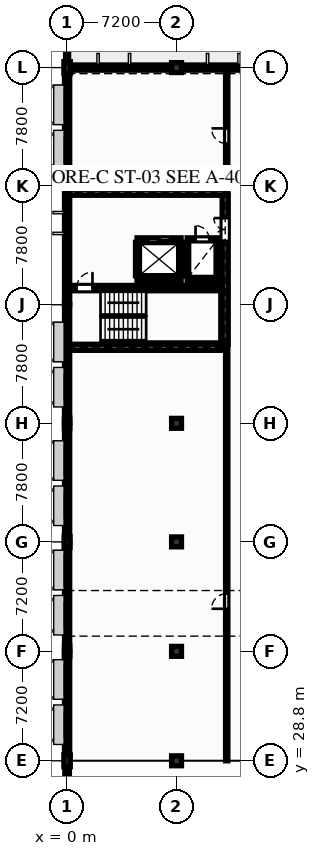
"""IFC4 building model, lengths in metres.
Left out: names, types, materials, properties, quantities, classifications, styles, units other than length and angle.
Written with IfcOpenShell. Run it as: python <this file> out.ifc"""

import sys

from ifc_helpers import new_model, si_unit, direction, frame, frame_2d, origin, origin_2d, place, context, subcontext, project, spatial, rectangle, extrude, element, fill, save


model = new_model("IFC4")
c1 = context("Model", 3, precision=1e-05, world=origin(), true_north=direction((0.0, 1.0)))
c2 = subcontext(c1, "Body", "Model", "MODEL_VIEW")
j1 = project(units=[si_unit("LENGTHUNIT", "METRE"), si_unit("PLANEANGLEUNIT", "RADIAN")], contexts=[c1])
p1 = place(None, origin())
s1 = spatial("IfcSite", under=j1, at=p1, CompositionType="ELEMENT")
p2 = place(p1, origin())
s2 = spatial("IfcBuilding", under=s1, at=p2, CompositionType="ELEMENT")
p3 = place(p2, frame((0.0, 0.0, 5.1)))
s3 = spatial("IfcBuildingStorey", under=s2, at=p3, CompositionType="ELEMENT", Elevation=5.1)
p4 = place(p3, frame((0.0, 28.8, 0.0), z_axis=(0.0, 0.0, 1.0), x_axis=(1.0, 0.0, 0.0)))
e1 = element("IfcColumn", 1, at=p4, inside=s3, PredefinedType="PILASTER", context=c2, shape_type="SweptSolid", body=[
    extrude(rectangle(XDim=0.42, YDim=0.78, at=origin_2d()), origin(), (0.0, 0.0, 1.0), 3.84),
])
p5 = place(p3, frame((0.0, 36.0, 0.0), z_axis=(0.0, 0.0, 1.0), x_axis=(1.0, 0.0, 0.0)))
e2 = element("IfcColumn", 2, at=p5, inside=s3, PredefinedType="PILASTER", context=c2, shape_type="SweptSolid", body=[
    extrude(rectangle(XDim=0.35, YDim=0.7, at=origin_2d()), origin(), (0.0, 0.0, 1.0), 3.84),
])
p6 = place(p3, frame((0.0, 43.2, 0.0), z_axis=(0.0, 0.0, 1.0), x_axis=(1.0, 0.0, 0.0)))
e3 = element("IfcColumn", 3, at=p6, inside=s3, PredefinedType="PILASTER", context=c2, shape_type="SweptSolid", body=[
    extrude(rectangle(XDim=0.38, YDim=0.72, at=origin_2d()), origin(), (0.0, 0.0, 1.0), 3.84),
])
p7 = place(p3, frame((0.0, 51.0, 0.0), z_axis=(0.0, 0.0, 1.0), x_axis=(1.0, 0.0, 0.0)))
e4 = element("IfcColumn", 4, at=p7, inside=s3, PredefinedType="PILASTER", context=c2, shape_type="SweptSolid", body=[
    extrude(rectangle(XDim=0.35, YDim=0.7, at=origin_2d()), origin(), (0.0, 0.0, 1.0), 3.84),
])
p8 = place(p3, frame((0.0, 74.4, 0.0), z_axis=(0.0, 0.0, 1.0), x_axis=(1.0, 0.0, 0.0)))
e5 = element("IfcColumn", 5, at=p8, inside=s3, PredefinedType="PILASTER", context=c2, shape_type="SweptSolid", body=[
    extrude(rectangle(XDim=0.42, YDim=0.78, at=origin_2d()), origin(), (0.0, 0.0, 1.0), 3.84),
])
for number, where, z_axis, x_axis in (
    (6, (7.2, 28.8, 0.0), (0.0, 0.0, 1.0), (1.0, 0.0, 0.0)),
    (7, (7.2, 36.0, 0.0), (0.0, 0.0, 1.0), (1.0, 0.0, 0.0)),
    (8, (7.2, 43.2, 0.0), (0.0, 0.0, 1.0), (1.0, 0.0, 0.0)),
    (9, (7.2, 51.0, 0.0), (0.0, 0.0, 1.0), (1.0, 0.0, 0.0)),
    (10, (7.2, 74.4, 0.0), (0.0, 0.0, 1.0), (1.0, 0.0, 0.0)),
):
    element("IfcColumn", number, at=place(p3, frame(where, z_axis=z_axis, x_axis=x_axis)), inside=s3, PredefinedType="COLUMN", context=c2, shape_type="SweptSolid", body=[
        extrude(rectangle(XDim=0.65, YDim=0.65, at=origin_2d()), origin(), (0.0, 0.0, 1.0), 3.84),
    ])
p9 = place(p3, frame((0.0, 28.8, 0.0), z_axis=(0.0, 0.0, 1.0), x_axis=(0.0, 1.0, 0.0)))
e11 = element("IfcWall", 11, at=p9, inside=s3, PredefinedType="SOLIDWALL", context=c2, shape_type="SweptSolid", body=[
    extrude(rectangle(XDim=7.2, YDim=0.34, at=frame_2d((3.6, 0.0))), origin(), (0.0, 0.0, 1.0), 3.55),
])
p10 = place(p9, frame((1.5, 0.0, 0.85)))
e12 = element("IfcOpeningElement", 12, at=p10, cuts=e11, PredefinedType="OPENING", context=c2, shape_type="SweptSolid", body=[
    extrude(rectangle(XDim=1.75, YDim=2.15, at=frame_2d((0.875, 1.075))), frame((0.0, 0.18, 0.0), z_axis=(0.0, -1.0, 0.0), x_axis=(1.0, 0.0, 0.0)), (0.0, 0.0, 1.0), 0.36),
])
p11 = place(p9, frame((4.3, 0.0, 0.828)))
e13 = element("IfcOpeningElement", 13, at=p11, cuts=e11, PredefinedType="OPENING", context=c2, shape_type="SweptSolid", body=[
    extrude(rectangle(XDim=2.1, YDim=2.25, at=frame_2d((1.05, 1.125))), frame((0.0, 0.18, 0.0), z_axis=(0.0, -1.0, 0.0), x_axis=(1.0, 0.0, 0.0)), (0.0, 0.0, 1.0), 0.36),
])
p12 = place(p3, frame((0.0, 36.0, 0.0), z_axis=(0.0, 0.0, 1.0), x_axis=(0.0, 1.0, 0.0)))
e14 = element("IfcWall", 14, at=p12, inside=s3, PredefinedType="SOLIDWALL", context=c2, shape_type="SweptSolid", body=[
    extrude(rectangle(XDim=7.2, YDim=0.34, at=frame_2d((3.6, 0.0))), origin(), (0.0, 0.0, 1.0), 3.55),
])
p13 = place(p12, frame((1.5, 0.0, 0.85)))
e15 = element("IfcOpeningElement", 15, at=p13, cuts=e14, PredefinedType="OPENING", context=c2, shape_type="SweptSolid", body=[
    extrude(rectangle(XDim=1.75, YDim=2.15, at=frame_2d((0.875, 1.075))), frame((0.0, 0.18, 0.0), z_axis=(0.0, -1.0, 0.0), x_axis=(1.0, 0.0, 0.0)), (0.0, 0.0, 1.0), 0.36),
])
p14 = place(p12, frame((4.3, 0.0, 0.798)))
e16 = element("IfcOpeningElement", 16, at=p14, cuts=e14, PredefinedType="OPENING", context=c2, shape_type="SweptSolid", body=[
    extrude(rectangle(XDim=2.1, YDim=2.25, at=frame_2d((1.05, 1.125))), frame((0.0, 0.18, 0.0), z_axis=(0.0, -1.0, 0.0), x_axis=(1.0, 0.0, 0.0)), (0.0, 0.0, 1.0), 0.36),
])
p15 = place(p3, frame((0.0, 43.2, 0.0), z_axis=(0.0, 0.0, 1.0), x_axis=(0.0, 1.0, 0.0)))
e17 = element("IfcWall", 17, at=p15, inside=s3, PredefinedType="SOLIDWALL", context=c2, shape_type="SweptSolid", body=[
    extrude(rectangle(XDim=7.8, YDim=0.34, at=frame_2d((3.9, 0.0))), origin(), (0.0, 0.0, 1.0), 3.55),
])
p16 = place(p15, frame((1.5, 0.0, 0.85)))
e18 = element("IfcOpeningElement", 18, at=p16, cuts=e17, PredefinedType="OPENING", context=c2, shape_type="SweptSolid", body=[
    extrude(rectangle(XDim=1.75, YDim=2.15, at=frame_2d((0.875, 1.075))), frame((0.0, 0.18, 0.0), z_axis=(0.0, -1.0, 0.0), x_axis=(1.0, 0.0, 0.0)), (0.0, 0.0, 1.0), 0.36),
])
p17 = place(p15, frame((4.3, 0.0, 0.798)))
e19 = element("IfcOpeningElement", 19, at=p17, cuts=e17, PredefinedType="OPENING", context=c2, shape_type="SweptSolid", body=[
    extrude(rectangle(XDim=2.1, YDim=2.25, at=frame_2d((1.05, 1.125))), frame((0.0, 0.18, 0.0), z_axis=(0.0, -1.0, 0.0), x_axis=(1.0, 0.0, 0.0)), (0.0, 0.0, 1.0), 0.36),
])
p18 = place(p3, frame((0.0, 51.0, 0.0), z_axis=(0.0, 0.0, 1.0), x_axis=(0.0, 1.0, 0.0)))
e20 = element("IfcWall", 20, at=p18, inside=s3, PredefinedType="SOLIDWALL", context=c2, shape_type="SweptSolid", body=[
    extrude(rectangle(XDim=7.8, YDim=0.34, at=frame_2d((3.9, 0.0))), origin(), (0.0, 0.0, 1.0), 3.55),
])
p19 = place(p18, frame((1.5, 0.0, 0.85)))
e21 = element("IfcOpeningElement", 21, at=p19, cuts=e20, PredefinedType="OPENING", context=c2, shape_type="SweptSolid", body=[
    extrude(rectangle(XDim=1.75, YDim=2.15, at=frame_2d((0.875, 1.075))), frame((0.0, 0.18, 0.0), z_axis=(0.0, -1.0, 0.0), x_axis=(1.0, 0.0, 0.0)), (0.0, 0.0, 1.0), 0.36),
])
p20 = place(p3, frame((0.0, 58.8, 0.0), z_axis=(0.0, 0.0, 1.0), x_axis=(0.0, 1.0, 0.0)))
e22 = element("IfcWall", 22, at=p20, inside=s3, PredefinedType="SOLIDWALL", context=c2, shape_type="SweptSolid", body=[
    extrude(rectangle(XDim=7.8, YDim=0.34, at=frame_2d((3.9, 0.0))), origin(), (0.0, 0.0, 1.0), 3.55),
])
p21 = place(p20, frame((4.85, 0.0, 1.1)))
e23 = element("IfcOpeningElement", 23, at=p21, cuts=e22, PredefinedType="OPENING", context=c2, shape_type="SweptSolid", body=[
    extrude(rectangle(XDim=1.05, YDim=1.75, at=frame_2d((0.525, 0.875))), frame((0.0, 0.18, 0.0), z_axis=(0.0, -1.0, 0.0), x_axis=(1.0, 0.0, 0.0)), (0.0, 0.0, 1.0), 0.36),
])
p22 = place(p3, frame((0.0, 66.6, 0.0), z_axis=(0.0, 0.0, 1.0), x_axis=(0.0, 1.0, 0.0)))
e24 = element("IfcWall", 24, at=p22, inside=s3, PredefinedType="SOLIDWALL", context=c2, shape_type="SweptSolid", body=[
    extrude(rectangle(XDim=7.8, YDim=0.34, at=frame_2d((3.9, 0.0))), origin(), (0.0, 0.0, 1.0), 3.55),
])
p23 = place(p22, frame((1.5, 0.0, 0.85)))
e25 = element("IfcOpeningElement", 25, at=p23, cuts=e24, PredefinedType="OPENING", context=c2, shape_type="SweptSolid", body=[
    extrude(rectangle(XDim=1.75, YDim=2.15, at=frame_2d((0.875, 1.075))), frame((0.0, 0.18, 0.0), z_axis=(0.0, -1.0, 0.0), x_axis=(1.0, 0.0, 0.0)), (0.0, 0.0, 1.0), 0.36),
])
p24 = place(p22, frame((4.3, 0.0, 0.85)))
e26 = element("IfcOpeningElement", 26, at=p24, cuts=e24, PredefinedType="OPENING", context=c2, shape_type="SweptSolid", body=[
    extrude(rectangle(XDim=2.1, YDim=2.25, at=frame_2d((1.05, 1.125))), frame((0.0, 0.18, 0.0), z_axis=(0.0, -1.0, 0.0), x_axis=(1.0, 0.0, 0.0)), (0.0, 0.0, 1.0), 0.36),
])
p25 = place(p3, frame((0.0, 74.4, 0.0), z_axis=(0.0, 0.0, 1.0), x_axis=(1.0, 0.0, 0.0)))
e27 = element("IfcWall", 27, at=p25, inside=s3, PredefinedType="SOLIDWALL", context=c2, shape_type="SweptSolid", body=[
    extrude(rectangle(XDim=7.2, YDim=0.34, at=frame_2d((3.6, 0.0))), origin(), (0.0, 0.0, 1.0), 3.55),
])
p26 = place(p25, frame((2.2, 0.0, 0.898)))
e28 = element("IfcOpeningElement", 28, at=p26, cuts=e27, PredefinedType="OPENING", context=c2, shape_type="SweptSolid", body=[
    extrude(rectangle(XDim=1.75, YDim=2.15, at=frame_2d((0.875, 1.075))), frame((0.0, 0.18, 0.0), z_axis=(0.0, -1.0, 0.0), x_axis=(1.0, 0.0, 0.0)), (0.0, 0.0, 1.0), 0.36),
])
p27 = place(p3, frame((7.2, 74.4, 0.0), z_axis=(0.0, 0.0, 1.0), x_axis=(1.0, 0.0, 0.0)))
e29 = element("IfcWall", 29, at=p27, inside=s3, PredefinedType="SOLIDWALL", context=c2, shape_type="SweptSolid", body=[
    extrude(rectangle(XDim=7.2, YDim=0.34, at=frame_2d((3.6, 0.0))), origin(), (0.0, 0.0, 1.0), 3.55),
])
p28 = place(p27, frame((4.4, 0.0, 0.898)))
e30 = element("IfcOpeningElement", 30, at=p28, cuts=e29, PredefinedType="OPENING", context=c2, shape_type="SweptSolid", body=[
    extrude(rectangle(XDim=1.75, YDim=2.15, at=frame_2d((0.875, 1.075))), frame((0.0, 0.18, 0.0), z_axis=(0.0, -1.0, 0.0), x_axis=(1.0, 0.0, 0.0)), (0.0, 0.0, 1.0), 0.36),
])
p29 = place(p3, frame((0.0, 21.6, 0.0), z_axis=(0.0, 0.0, 1.0), x_axis=(0.0, 1.0, 0.0)))
e31 = element("IfcWall", 31, at=p29, inside=s3, PredefinedType="SOLIDWALL", context=c2, shape_type="SweptSolid", body=[
    extrude(rectangle(XDim=7.2, YDim=0.3, at=frame_2d((3.6, 0.0))), origin(), (0.0, 0.0, 1.0), 2.905),
])
p30 = place(p29, frame((2.0, 0.0, 0.685)))
e32 = element("IfcOpeningElement", 32, at=p30, cuts=e31, PredefinedType="OPENING", context=c2, shape_type="SweptSolid", body=[
    extrude(rectangle(XDim=1.2, YDim=2.1, at=frame_2d((0.6, 1.05))), frame((0.0, 0.16, 0.0), z_axis=(0.0, -1.0, 0.0), x_axis=(1.0, 0.0, 0.0)), (0.0, 0.0, 1.0), 0.32),
])
p31 = place(p3, frame((0.0, 82.0, 0.0), z_axis=(0.0, 0.0, 1.0), x_axis=(0.0, -1.0, 0.0)))
e33 = element("IfcWall", 33, at=p31, inside=s3, PredefinedType="PARAPET", context=c2, shape_type="SweptSolid", body=[
    extrude(rectangle(XDim=7.4, YDim=0.2, at=frame_2d((3.7, 0.0))), origin(), (0.0, 0.0, 1.0), 0.72),
])
for number, where, z_axis, x_axis in (
    (34, (0.17, 56.0, 0.0), (0.0, 0.0, 1.0), (1.0, 0.0, 0.0)),
    (35, (0.17, 66.2, 0.0), (0.0, 0.0, 1.0), (1.0, 0.0, 0.0)),
):
    element("IfcWall", number, at=place(p3, frame(where, z_axis=z_axis, x_axis=x_axis)), inside=s3, PredefinedType="SHEAR", context=c2, shape_type="SweptSolid", body=[
        extrude(rectangle(XDim=10.23, YDim=0.4, at=frame_2d((5.115, 0.0))), origin(), (0.0, 0.0, 1.0), 3.55),
    ])
p32 = place(p3, frame((10.4, 56.2, 0.0), z_axis=(0.0, 0.0, 1.0), x_axis=(0.0, 1.0, 0.0)))
e36 = element("IfcWall", 36, at=p32, inside=s3, PredefinedType="SHEAR", context=c2, shape_type="SweptSolid", body=[
    extrude(rectangle(XDim=9.8, YDim=0.4, at=frame_2d((4.9, 0.0))), origin(), (0.0, 0.0, 1.0), 3.55),
])
p33 = place(p32, frame((6.8, 0.0, 0.0)))
e37 = element("IfcOpeningElement", 37, at=p33, cuts=e36, PredefinedType="OPENING", context=c2, shape_type="SweptSolid", body=[
    extrude(rectangle(XDim=1.5, YDim=2.2, at=frame_2d((0.75, 1.1))), frame((0.0, 0.21, 0.0), z_axis=(0.0, -1.0, 0.0), x_axis=(1.0, 0.0, 0.0)), (0.0, 0.0, 1.0), 0.42),
])
p34 = place(p3, frame((0.17, 59.895, 0.0), z_axis=(0.0, 0.0, 1.0), x_axis=(1.0, 0.0, 0.0)))
e38 = element("IfcWall", 38, at=p34, inside=s3, PredefinedType="SHEAR", context=c2, shape_type="SweptSolid", body=[
    extrude(rectangle(XDim=10.03, YDim=0.35, at=frame_2d((5.015, 0.0))), origin(), (0.0, 0.0, 1.0), 3.55),
])
p35 = place(p34, frame((0.45, 0.0, 0.0)))
e39 = element("IfcOpeningElement", 39, at=p35, cuts=e38, PredefinedType="OPENING", context=c2, shape_type="SweptSolid", body=[
    extrude(rectangle(XDim=1.05, YDim=2.2, at=frame_2d((0.525, 1.1))), frame((0.0, 0.185, 0.0), z_axis=(0.0, -1.0, 0.0), x_axis=(1.0, 0.0, 0.0)), (0.0, 0.0, 1.0), 0.37),
])
p36 = place(p3, frame((4.6, 60.5, 0.0), z_axis=(0.0, 0.0, 1.0), x_axis=(1.0, 0.0, 0.0)))
e40 = element("IfcWall", 40, at=p36, inside=s3, PredefinedType="PARTITIONING", context=c2, shape_type="SweptSolid", body=[
    extrude(rectangle(XDim=2.9, YDim=0.2, at=frame_2d((1.45, 0.0))), origin(), (0.0, 0.0, 1.0), 3.55),
])
p37 = place(p3, frame((4.6, 63.1, 0.0), z_axis=(0.0, 0.0, 1.0), x_axis=(1.0, 0.0, 0.0)))
e41 = element("IfcWall", 41, at=p37, inside=s3, PredefinedType="PARTITIONING", context=c2, shape_type="SweptSolid", body=[
    extrude(rectangle(XDim=2.9, YDim=0.2, at=frame_2d((1.45, 0.0))), origin(), (0.0, 0.0, 1.0), 3.55),
])
p38 = place(p37, frame((0.75, 0.0, 0.0)))
e42 = element("IfcOpeningElement", 42, at=p38, cuts=e41, PredefinedType="OPENING", context=c2, shape_type="SweptSolid", body=[
    extrude(rectangle(XDim=1.4, YDim=2.25, at=frame_2d((0.7, 1.125))), frame((0.0, 0.11, 0.0), z_axis=(0.0, -1.0, 0.0), x_axis=(1.0, 0.0, 0.0)), (0.0, 0.0, 1.0), 0.22),
])
for number, where, z_axis, x_axis in (
    (43, (4.6, 60.7, 0.0), (0.0, 0.0, 1.0), (0.0, 1.0, 0.0)),
    (44, (7.5, 60.7, 0.0), (0.0, 0.0, 1.0), (0.0, 1.0, 0.0)),
):
    element("IfcWall", number, at=place(p3, frame(where, z_axis=z_axis, x_axis=x_axis)), inside=s3, PredefinedType="PARTITIONING", context=c2, shape_type="SweptSolid", body=[
        extrude(rectangle(XDim=2.2, YDim=0.2, at=frame_2d((1.1, 0.0))), origin(), (0.0, 0.0, 1.0), 3.55),
    ])
p39 = place(p3, frame((7.9, 60.5, 0.0), z_axis=(0.0, 0.0, 1.0), x_axis=(1.0, 0.0, 0.0)))
e45 = element("IfcWall", 45, at=p39, inside=s3, PredefinedType="PARTITIONING", context=c2, shape_type="SweptSolid", body=[
    extrude(rectangle(XDim=2.0, YDim=0.2, at=frame_2d((1.0, 0.0))), origin(), (0.0, 0.0, 1.0), 3.55),
])
p40 = place(p3, frame((7.9, 63.1, 0.0), z_axis=(0.0, 0.0, 1.0), x_axis=(1.0, 0.0, 0.0)))
e46 = element("IfcWall", 46, at=p40, inside=s3, PredefinedType="PARTITIONING", context=c2, shape_type="SweptSolid", body=[
    extrude(rectangle(XDim=2.0, YDim=0.2, at=frame_2d((1.0, 0.0))), origin(), (0.0, 0.0, 1.0), 3.55),
])
p41 = place(p40, frame((0.55, 0.0, 0.0)))
e47 = element("IfcOpeningElement", 47, at=p41, cuts=e46, PredefinedType="OPENING", context=c2, shape_type="SweptSolid", body=[
    extrude(rectangle(XDim=0.9, YDim=2.1, at=frame_2d((0.45, 1.05))), frame((0.0, 0.11, 0.0), z_axis=(0.0, -1.0, 0.0), x_axis=(1.0, 0.0, 0.0)), (0.0, 0.0, 1.0), 0.22),
])
for number, where, z_axis, x_axis in (
    (48, (7.9, 60.7, 0.0), (0.0, 0.0, 1.0), (0.0, 1.0, 0.0)),
    (49, (9.9, 60.7, 0.0), (0.0, 0.0, 1.0), (0.0, 1.0, 0.0)),
):
    element("IfcWall", number, at=place(p3, frame(where, z_axis=z_axis, x_axis=x_axis)), inside=s3, PredefinedType="PARTITIONING", context=c2, shape_type="SweptSolid", body=[
        extrude(rectangle(XDim=2.2, YDim=0.2, at=frame_2d((1.1, 0.0))), origin(), (0.0, 0.0, 1.0), 3.55),
    ])
p42 = place(p3, frame((10.5, 28.8, 0.0), z_axis=(0.0, 0.0, 1.0), x_axis=(0.0, 1.0, 0.0)))
e50 = element("IfcWall", 50, at=p42, inside=s3, PredefinedType="PARTITIONING", context=c2, shape_type="SweptSolid", body=[
    extrude(rectangle(XDim=27.2, YDim=0.15, at=frame_2d((13.6, 0.0))), origin(), (0.0, 0.0, 1.0), 3.199),
])
p43 = place(p42, frame((10.0, 0.0, 0.0)))
e51 = element("IfcOpeningElement", 51, at=p43, cuts=e50, PredefinedType="OPENING", context=c2, shape_type="SweptSolid", body=[
    extrude(rectangle(XDim=1.0, YDim=2.15, at=frame_2d((0.5, 1.075))), frame((0.0, 0.085, 0.0), z_axis=(0.0, -1.0, 0.0), x_axis=(1.0, 0.0, 0.0)), (0.0, 0.0, 1.0), 0.17),
])
p44 = place(p3, frame((10.5, 66.2, 0.0), z_axis=(0.0, 0.0, 1.0), x_axis=(0.0, 1.0, 0.0)))
e52 = element("IfcWall", 52, at=p44, inside=s3, PredefinedType="PARTITIONING", context=c2, shape_type="SweptSolid", body=[
    extrude(rectangle(XDim=8.2, YDim=0.15, at=frame_2d((4.1, 0.0))), origin(), (0.0, 0.0, 1.0), 3.55),
])
p45 = place(p44, frame((3.2, 0.0, 0.0)))
e53 = element("IfcOpeningElement", 53, at=p45, cuts=e52, PredefinedType="OPENING", context=c2, shape_type="SweptSolid", body=[
    extrude(rectangle(XDim=1.0, YDim=2.15, at=frame_2d((0.5, 1.075))), frame((0.0, 0.085, 0.0), z_axis=(0.0, -1.0, 0.0), x_axis=(1.0, 0.0, 0.0)), (0.0, 0.0, 1.0), 0.17),
])
p46 = place(p10, origin())
e54 = element("IfcWindow", 54, at=p46, inside=s3, PartitioningType="SINGLE_PANEL", PredefinedType="WINDOW", context=c2, shape_type="SweptSolid", body=[
    extrude(rectangle(XDim=1.75, YDim=2.15, at=frame_2d((0.875, 1.075))), frame((0.0, 0.03, 0.0), z_axis=(0.0, -1.0, 0.0), x_axis=(1.0, 0.0, 0.0)), (0.0, 0.0, 1.0), 0.06),
])
fill(e12, e54)
p47 = place(p11, origin())
e55 = element("IfcWindow", 55, at=p47, inside=s3, PartitioningType="SINGLE_PANEL", PredefinedType="WINDOW", context=c2, shape_type="SweptSolid", body=[
    extrude(rectangle(XDim=2.1, YDim=2.25, at=frame_2d((1.05, 1.125))), frame((0.0, 0.03, 0.0), z_axis=(0.0, -1.0, 0.0), x_axis=(1.0, 0.0, 0.0)), (0.0, 0.0, 1.0), 0.06),
])
fill(e13, e55)
p48 = place(p13, origin())
e56 = element("IfcWindow", 56, at=p48, inside=s3, PartitioningType="SINGLE_PANEL", PredefinedType="WINDOW", context=c2, shape_type="SweptSolid", body=[
    extrude(rectangle(XDim=1.75, YDim=2.15, at=frame_2d((0.875, 1.075))), frame((0.0, 0.03, 0.0), z_axis=(0.0, -1.0, 0.0), x_axis=(1.0, 0.0, 0.0)), (0.0, 0.0, 1.0), 0.06),
])
fill(e15, e56)
p49 = place(p14, origin())
e57 = element("IfcWindow", 57, at=p49, inside=s3, PartitioningType="SINGLE_PANEL", PredefinedType="WINDOW", context=c2, shape_type="SweptSolid", body=[
    extrude(rectangle(XDim=2.1, YDim=2.25, at=frame_2d((1.05, 1.125))), frame((0.0, 0.03, 0.0), z_axis=(0.0, -1.0, 0.0), x_axis=(1.0, 0.0, 0.0)), (0.0, 0.0, 1.0), 0.06),
])
fill(e16, e57)
p50 = place(p16, origin())
e58 = element("IfcWindow", 58, at=p50, inside=s3, PartitioningType="SINGLE_PANEL", PredefinedType="WINDOW", context=c2, shape_type="SweptSolid", body=[
    extrude(rectangle(XDim=1.75, YDim=2.15, at=frame_2d((0.875, 1.075))), frame((0.0, 0.03, 0.0), z_axis=(0.0, -1.0, 0.0), x_axis=(1.0, 0.0, 0.0)), (0.0, 0.0, 1.0), 0.06),
])
fill(e18, e58)
p51 = place(p17, origin())
e59 = element("IfcWindow", 59, at=p51, inside=s3, PartitioningType="SINGLE_PANEL", PredefinedType="WINDOW", context=c2, shape_type="SweptSolid", body=[
    extrude(rectangle(XDim=2.1, YDim=2.25, at=frame_2d((1.05, 1.125))), frame((0.0, 0.03, 0.0), z_axis=(0.0, -1.0, 0.0), x_axis=(1.0, 0.0, 0.0)), (0.0, 0.0, 1.0), 0.06),
])
fill(e19, e59)
p52 = place(p19, origin())
e60 = element("IfcWindow", 60, at=p52, inside=s3, PartitioningType="SINGLE_PANEL", PredefinedType="WINDOW", context=c2, shape_type="SweptSolid", body=[
    extrude(rectangle(XDim=1.75, YDim=2.15, at=frame_2d((0.875, 1.075))), frame((0.0, 0.03, 0.0), z_axis=(0.0, -1.0, 0.0), x_axis=(1.0, 0.0, 0.0)), (0.0, 0.0, 1.0), 0.06),
])
fill(e21, e60)
p53 = place(p21, origin())
e61 = element("IfcWindow", 61, at=p53, inside=s3, PartitioningType="SINGLE_PANEL", PredefinedType="WINDOW", context=c2, shape_type="SweptSolid", body=[
    extrude(rectangle(XDim=1.05, YDim=1.75, at=frame_2d((0.525, 0.875))), frame((0.0, 0.03, 0.0), z_axis=(0.0, -1.0, 0.0), x_axis=(1.0, 0.0, 0.0)), (0.0, 0.0, 1.0), 0.06),
])
fill(e23, e61)
p54 = place(p23, origin())
e62 = element("IfcWindow", 62, at=p54, inside=s3, PartitioningType="SINGLE_PANEL", PredefinedType="WINDOW", context=c2, shape_type="SweptSolid", body=[
    extrude(rectangle(XDim=1.75, YDim=2.15, at=frame_2d((0.875, 1.075))), frame((0.0, 0.03, 0.0), z_axis=(0.0, -1.0, 0.0), x_axis=(1.0, 0.0, 0.0)), (0.0, 0.0, 1.0), 0.06),
])
fill(e25, e62)
p55 = place(p24, origin())
e63 = element("IfcWindow", 63, at=p55, inside=s3, PartitioningType="SINGLE_PANEL", PredefinedType="WINDOW", context=c2, shape_type="SweptSolid", body=[
    extrude(rectangle(XDim=2.1, YDim=2.25, at=frame_2d((1.05, 1.125))), frame((0.0, 0.03, 0.0), z_axis=(0.0, -1.0, 0.0), x_axis=(1.0, 0.0, 0.0)), (0.0, 0.0, 1.0), 0.06),
])
fill(e26, e63)
p56 = place(p26, origin())
e64 = element("IfcWindow", 64, at=p56, inside=s3, PartitioningType="SINGLE_PANEL", PredefinedType="WINDOW", context=c2, shape_type="SweptSolid", body=[
    extrude(rectangle(XDim=1.75, YDim=2.15, at=frame_2d((0.875, 1.075))), frame((0.0, 0.03, 0.0), z_axis=(0.0, -1.0, 0.0), x_axis=(1.0, 0.0, 0.0)), (0.0, 0.0, 1.0), 0.06),
])
fill(e28, e64)
p57 = place(p33, origin())
e65 = element("IfcDoor", 65, at=p57, inside=s3, OperationType="DOUBLE_DOOR_SINGLE_SWING", PredefinedType="DOOR", context=c2, shape_type="SweptSolid", body=[
    extrude(rectangle(XDim=1.5, YDim=2.2, at=frame_2d((0.75, 1.1))), frame((0.0, 0.025, 0.0), z_axis=(0.0, -1.0, 0.0), x_axis=(1.0, 0.0, 0.0)), (0.0, 0.0, 1.0), 0.05),
])
fill(e37, e65)
p58 = place(p35, origin())
e66 = element("IfcDoor", 66, at=p58, inside=s3, OperationType="SINGLE_SWING_RIGHT", PredefinedType="DOOR", context=c2, shape_type="SweptSolid", body=[
    extrude(rectangle(XDim=1.05, YDim=2.2, at=frame_2d((0.525, 1.1))), frame((0.0, 0.025, 0.0), z_axis=(0.0, -1.0, 0.0), x_axis=(1.0, 0.0, 0.0)), (0.0, 0.0, 1.0), 0.05),
])
fill(e39, e66)
p59 = place(p38, origin())
e67 = element("IfcDoor", 67, at=p59, inside=s3, OperationType="SLIDING_TO_LEFT", PredefinedType="DOOR", context=c2, shape_type="SweptSolid", body=[
    extrude(rectangle(XDim=1.4, YDim=2.25, at=frame_2d((0.7, 1.125))), frame((0.0, 0.025, 0.0), z_axis=(0.0, -1.0, 0.0), x_axis=(1.0, 0.0, 0.0)), (0.0, 0.0, 1.0), 0.05),
])
fill(e42, e67)
p60 = place(p41, origin())
e68 = element("IfcDoor", 68, at=p60, inside=s3, OperationType="SINGLE_SWING_LEFT", PredefinedType="DOOR", context=c2, shape_type="SweptSolid", body=[
    extrude(rectangle(XDim=0.9, YDim=2.1, at=frame_2d((0.45, 1.05))), frame((0.0, 0.025, 0.0), z_axis=(0.0, -1.0, 0.0), x_axis=(1.0, 0.0, 0.0)), (0.0, 0.0, 1.0), 0.05),
])
fill(e47, e68)
p61 = place(p43, origin())
e69 = element("IfcDoor", 69, at=p61, inside=s3, OperationType="SINGLE_SWING_LEFT", PredefinedType="DOOR", context=c2, shape_type="SweptSolid", body=[
    extrude(rectangle(XDim=1.0, YDim=2.15, at=frame_2d((0.5, 1.075))), frame((0.0, 0.025, 0.0), z_axis=(0.0, -1.0, 0.0), x_axis=(1.0, 0.0, 0.0)), (0.0, 0.0, 1.0), 0.05),
])
fill(e51, e69)
p62 = place(p45, origin())
e70 = element("IfcDoor", 70, at=p62, inside=s3, OperationType="SINGLE_SWING_RIGHT", PredefinedType="DOOR", context=c2, shape_type="SweptSolid", body=[
    extrude(rectangle(XDim=1.0, YDim=2.15, at=frame_2d((0.5, 1.075))), frame((0.0, 0.025, 0.0), z_axis=(0.0, -1.0, 0.0), x_axis=(1.0, 0.0, 0.0)), (0.0, 0.0, 1.0), 0.05),
])
fill(e53, e70)
save(model, sys.argv[1])
